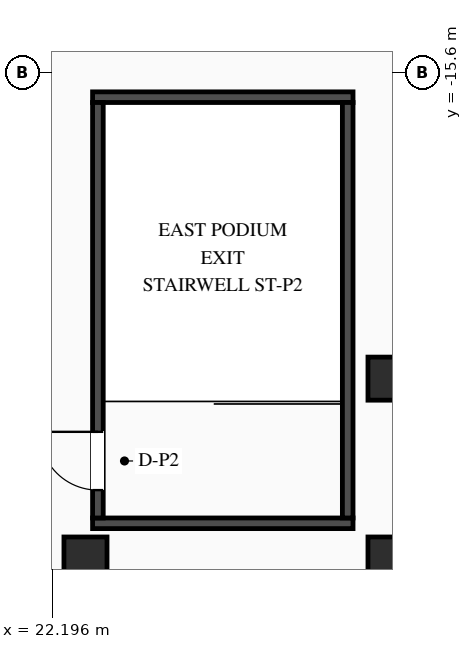
"""IFC4 building model, lengths in metres.
Left out: names, types, materials, properties, quantities, classifications, styles, units other than length and angle.
Written with IfcOpenShell. Run it as: python <this file> out.ifc"""

import sys

from ifc_helpers import new_model, si_unit, direction, frame, frame_2d, origin, origin_2d, place, context, subcontext, project, spatial, rectangle, i_section, extrude, element, fill, save


model = new_model("IFC4")
c1 = context("Model", 3, precision=1e-05, world=origin(), true_north=direction((0.0, 1.0)))
c2 = subcontext(c1, "Body", "Model", "MODEL_VIEW")
j1 = project(units=[si_unit("LENGTHUNIT", "METRE"), si_unit("PLANEANGLEUNIT", "RADIAN")], contexts=[c1])
p1 = place(None, origin())
s1 = spatial("IfcSite", under=j1, at=p1, CompositionType="ELEMENT")
p2 = place(p1, origin())
s2 = spatial("IfcBuilding", under=s1, at=p2, CompositionType="ELEMENT")
p3 = place(p2, frame((0.0, 0.0, 22.8)))
s3 = spatial("IfcBuildingStorey", under=s2, at=p3, CompositionType="ELEMENT", Elevation=22.8)
for number, where, z_axis, x_axis in (
    (1, (22.99, -24.505, 0.0), (0.0, 0.0, 1.0), (1.0, 0.0, 0.0)),
    (2, (22.99, -16.095, 0.0), (0.0, 0.0, 1.0), (1.0, 0.0, 0.0)),
):
    element("IfcWall", number, at=place(p3, frame(where, z_axis=z_axis, x_axis=x_axis)), inside=s3, PredefinedType="SHEAR", context=c2, shape_type="SweptSolid", body=[
        extrude(rectangle(XDim=5.14, YDim=0.21, at=frame_2d((2.57, 0.0))), origin(), (0.0, 0.0, 1.0), 3.92),
    ])
p4 = place(p3, frame((23.095, -24.4, 0.0), z_axis=(0.0, 0.0, 1.0), x_axis=(0.0, 1.0, 0.0)))
e3 = element("IfcWall", 3, at=p4, inside=s3, PredefinedType="SHEAR", context=c2, shape_type="SweptSolid", body=[
    extrude(rectangle(XDim=8.2, YDim=0.21, at=frame_2d((4.1, 0.0))), origin(), (0.0, 0.0, 1.0), 3.92),
])
p5 = place(p4, frame((0.55, 0.0, 0.0)))
e4 = element("IfcOpeningElement", 4, at=p5, cuts=e3, PredefinedType="OPENING", context=c2, shape_type="SweptSolid", body=[
    extrude(rectangle(XDim=1.15, YDim=2.1, at=frame_2d((0.575, 1.05))), frame((0.0, 0.115, 0.0), z_axis=(0.0, -1.0, 0.0), x_axis=(1.0, 0.0, 0.0)), (0.0, 0.0, 1.0), 0.23),
])
p6 = place(p3, frame((28.025, -24.4, 0.0), z_axis=(0.0, 0.0, 1.0), x_axis=(0.0, 1.0, 0.0)))
e5 = element("IfcWall", 5, at=p6, inside=s3, PredefinedType="SHEAR", context=c2, shape_type="SweptSolid", body=[
    extrude(rectangle(XDim=8.2, YDim=0.21, at=frame_2d((4.1, 0.0))), origin(), (0.0, 0.0, 1.0), 3.92),
])
for number, where, z_axis, x_axis in (
    (6, (28.85, -21.65, 0.0), (0.0, 0.0, 1.0), (1.0, 0.0, 0.0)),
    (7, (22.85, -25.2, 0.0), (0.0, 0.0, 1.0), (1.0, 0.0, 0.0)),
    (8, (28.85, -25.2, 0.0), (0.0, 0.0, 1.0), (1.0, 0.0, 0.0)),
):
    element("IfcColumn", number, at=place(p3, frame(where, z_axis=z_axis, x_axis=x_axis)), inside=s3, PredefinedType="COLUMN", context=c2, shape_type="SweptSolid", body=[
        extrude(i_section(OverallWidth=0.85, OverallDepth=0.85, WebThickness=0.032, FlangeThickness=0.048, at=origin_2d()), origin(), (0.0, 0.0, 1.0), 4.2),
    ])
p7 = place(p5, origin())
e9 = element("IfcDoor", 9, at=p7, inside=s3, OperationType="SINGLE_SWING_RIGHT", PredefinedType="DOOR", context=c2, shape_type="SweptSolid", body=[
    extrude(rectangle(XDim=1.15, YDim=2.1, at=frame_2d((0.575, 1.05))), frame((0.0, 0.025, 0.0), z_axis=(0.0, -1.0, 0.0), x_axis=(1.0, 0.0, 0.0)), (0.0, 0.0, 1.0), 0.05),
])
fill(e4, e9)
save(model, sys.argv[1])
